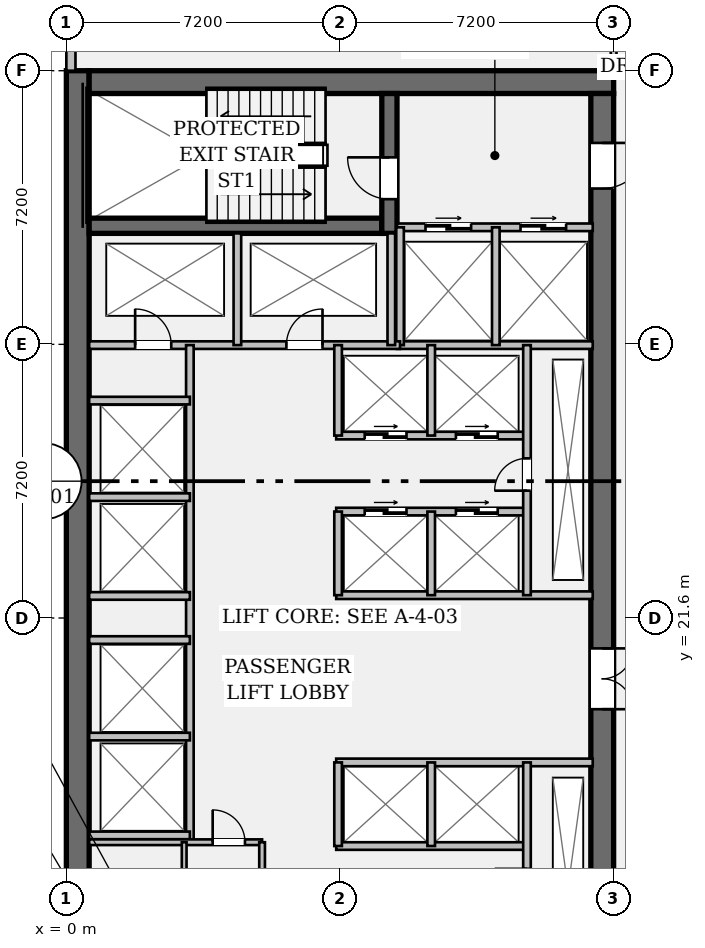
"""IFC4 building model, lengths in metres.
Left out: names, types, materials, properties, quantities, classifications, styles, units other than length and angle.
Written with IfcOpenShell. Run it as: python <this file> out.ifc"""

import sys

from ifc_helpers import new_model, si_unit, direction, frame, frame_2d, origin, place, context, subcontext, project, spatial, rectangle, extrude, element, fill, save


model = new_model("IFC4")
c1 = context("Model", 3, precision=1e-05, world=origin(), true_north=direction((0.0, 1.0)))
c2 = subcontext(c1, "Body", "Model", "MODEL_VIEW")
j1 = project(units=[si_unit("LENGTHUNIT", "METRE"), si_unit("PLANEANGLEUNIT", "RADIAN")], contexts=[c1])
p1 = place(None, origin())
s1 = spatial("IfcSite", under=j1, at=p1, CompositionType="ELEMENT")
p2 = place(p1, origin())
s2 = spatial("IfcBuilding", under=s1, at=p2, CompositionType="ELEMENT")
p3 = place(p2, frame((0.0, 0.0, 22.05)))
s3 = spatial("IfcBuildingStorey", under=s2, at=p3, CompositionType="ELEMENT", Elevation=22.05)
p4 = place(p3, frame((0.3, 7.2, 0.0), z_axis=(0.0, 0.0, 1.0), x_axis=(0.0, 1.0, 0.0)))
e1 = element("IfcWall", 1, at=p4, inside=s3, PredefinedType="SHEAR", context=c2, shape_type="SweptSolid", body=[
    extrude(rectangle(XDim=28.8, YDim=0.6, at=frame_2d((14.4, 0.0))), origin(), (0.0, 0.0, 1.0), 3.9),
])
p5 = place(p3, frame((0.6, 35.7, 0.0), z_axis=(0.0, 0.0, 1.0), x_axis=(1.0, 0.0, 0.0)))
e2 = element("IfcWall", 2, at=p5, inside=s3, PredefinedType="SHEAR", context=c2, shape_type="SweptSolid", body=[
    extrude(rectangle(XDim=13.8, YDim=0.6, at=frame_2d((6.9, 0.0))), origin(), (0.0, 0.0, 1.0), 3.9),
])
p6 = place(p3, frame((14.1, 35.4, 0.0), z_axis=(0.0, 0.0, 1.0), x_axis=(0.0, -1.0, 0.0)))
e3 = element("IfcWall", 3, at=p6, inside=s3, PredefinedType="SHEAR", context=c2, shape_type="SweptSolid", body=[
    extrude(rectangle(XDim=27.6, YDim=0.6, at=frame_2d((13.8, 0.0))), origin(), (0.0, 0.0, 1.0), 3.9),
])
p7 = place(p6, frame((1.3, 0.0, 0.0)))
e4 = element("IfcOpeningElement", 4, at=p7, cuts=e3, PredefinedType="OPENING", context=c2, shape_type="SweptSolid", body=[
    extrude(rectangle(XDim=1.2, YDim=2.15, at=frame_2d((0.6, 1.075))), frame((0.0, 0.312, 0.0), z_axis=(0.0, -1.0, 0.0), x_axis=(1.0, 0.0, 0.0)), (0.0, 0.0, 1.0), 0.624),
])
p8 = place(p6, frame((25.25, 0.0, 0.0)))
e5 = element("IfcOpeningElement", 5, at=p8, cuts=e3, PredefinedType="OPENING", context=c2, shape_type="SweptSolid", body=[
    extrude(rectangle(XDim=1.2, YDim=2.15, at=frame_2d((0.6, 1.075))), frame((0.0, 0.312, 0.0), z_axis=(0.0, -1.0, 0.0), x_axis=(1.0, 0.0, 0.0)), (0.0, 0.0, 1.0), 0.624),
])
p9 = place(p6, frame((14.6, 0.0, 0.0)))
e6 = element("IfcOpeningElement", 6, at=p9, cuts=e3, PredefinedType="OPENING", context=c2, shape_type="SweptSolid", body=[
    extrude(rectangle(XDim=1.6, YDim=2.2, at=frame_2d((0.8, 1.1))), frame((0.0, 0.312, 0.0), z_axis=(0.0, -1.0, 0.0), x_axis=(1.0, 0.0, 0.0)), (0.0, 0.0, 1.0), 0.624),
])
p10 = place(p3, frame((0.6, 31.92, 0.0), z_axis=(0.0, 0.0, 1.0), x_axis=(1.0, 0.0, 0.0)))
e7 = element("IfcWall", 7, at=p10, inside=s3, PredefinedType="SHEAR", context=c2, shape_type="SweptSolid", body=[
    extrude(rectangle(XDim=7.7, YDim=0.4, at=frame_2d((3.85, 0.0))), origin(), (0.0, 0.0, 1.0), 3.9),
])
p11 = place(p3, frame((8.5, 31.72, 0.0), z_axis=(0.0, 0.0, 1.0), x_axis=(0.0, 1.0, 0.0)))
e8 = element("IfcWall", 8, at=p11, inside=s3, PredefinedType="SHEAR", context=c2, shape_type="SweptSolid", body=[
    extrude(rectangle(XDim=3.68, YDim=0.4, at=frame_2d((1.84, 0.0))), origin(), (0.0, 0.0, 1.0), 3.9),
])
p12 = place(p11, frame((0.9, 0.0, 0.0)))
e9 = element("IfcOpeningElement", 9, at=p12, cuts=e8, PredefinedType="OPENING", context=c2, shape_type="SweptSolid", body=[
    extrude(rectangle(XDim=1.1, YDim=2.15, at=frame_2d((0.55, 1.075))), frame((0.0, 0.212, 0.0), z_axis=(0.0, -1.0, 0.0), x_axis=(1.0, 0.0, 0.0)), (0.0, 0.0, 1.0), 0.424),
])
p13 = place(p3, frame((0.12, 36.0, 0.0), z_axis=(0.0, 0.0, 1.0), x_axis=(0.0, 1.0, 0.0)))
e10 = element("IfcWall", 10, at=p13, inside=s3, PredefinedType="STANDARD", context=c2, shape_type="SweptSolid", body=[
    extrude(rectangle(XDim=11.58, YDim=0.24, at=frame_2d((5.79, 0.0))), origin(), (0.0, 0.0, 1.0), 3.9),
])
p14 = place(p13, frame((4.44, 0.0, 0.95)))
e11 = element("IfcOpeningElement", 11, at=p14, cuts=e10, PredefinedType="OPENING", context=c2, shape_type="SweptSolid", body=[
    extrude(rectangle(XDim=2.7, YDim=1.65, at=frame_2d((1.35, 0.825))), frame((0.0, 0.132, 0.0), z_axis=(0.0, -1.0, 0.0), x_axis=(1.0, 0.0, 0.0)), (0.0, 0.0, 1.0), 0.264),
])
p15 = place(p3, frame((8.7, 31.88, 0.0), z_axis=(0.0, 0.0, 1.0), x_axis=(1.0, 0.0, 0.0)))
e12 = element("IfcWall", 12, at=p15, inside=s3, PredefinedType="PARTITIONING", context=c2, shape_type="SweptSolid", body=[
    extrude(rectangle(XDim=5.15, YDim=0.2, at=frame_2d((2.575, 0.0))), origin(), (0.0, 0.0, 1.0), 3.9),
])
p16 = place(p15, frame((0.75, 0.0, 0.0)))
e13 = element("IfcOpeningElement", 13, at=p16, cuts=e12, PredefinedType="OPENING", context=c2, shape_type="SweptSolid", body=[
    extrude(rectangle(XDim=1.2, YDim=2.2, at=frame_2d((0.6, 1.1))), frame((0.0, 0.112, 0.0), z_axis=(0.0, -1.0, 0.0), x_axis=(1.0, 0.0, 0.0)), (0.0, 0.0, 1.0), 0.224),
])
p17 = place(p15, frame((3.25, 0.0, 0.0)))
e14 = element("IfcOpeningElement", 14, at=p17, cuts=e12, PredefinedType="OPENING", context=c2, shape_type="SweptSolid", body=[
    extrude(rectangle(XDim=1.2, YDim=2.2, at=frame_2d((0.6, 1.1))), frame((0.0, 0.112, 0.0), z_axis=(0.0, -1.0, 0.0), x_axis=(1.0, 0.0, 0.0)), (0.0, 0.0, 1.0), 0.224),
])
p18 = place(p3, frame((8.7, 28.78, 0.0), z_axis=(0.0, 0.0, 1.0), x_axis=(1.0, 0.0, 0.0)))
e15 = element("IfcWall", 15, at=p18, inside=s3, PredefinedType="PARTITIONING", context=c2, shape_type="SweptSolid", body=[
    extrude(rectangle(XDim=5.15, YDim=0.2, at=frame_2d((2.575, 0.0))), origin(), (0.0, 0.0, 1.0), 3.9),
])
for number, where, z_axis, x_axis in (
    (16, (8.78, 28.78, 0.0), (0.0, 0.0, 1.0), (0.0, 1.0, 0.0)),
    (17, (11.3, 28.78, 0.0), (0.0, 0.0, 1.0), (0.0, 1.0, 0.0)),
):
    element("IfcWall", number, at=place(p3, frame(where, z_axis=z_axis, x_axis=x_axis)), inside=s3, PredefinedType="PARTITIONING", context=c2, shape_type="SweptSolid", body=[
        extrude(rectangle(XDim=3.1, YDim=0.2, at=frame_2d((1.55, 0.0))), origin(), (0.0, 0.0, 1.0), 3.9),
    ])
p19 = place(p3, frame((0.6, 28.78, 0.0), z_axis=(0.0, 0.0, 1.0), x_axis=(1.0, 0.0, 0.0)))
e18 = element("IfcWall", 18, at=p19, inside=s3, PredefinedType="PARTITIONING", context=c2, shape_type="SweptSolid", body=[
    extrude(rectangle(XDim=8.18, YDim=0.2, at=frame_2d((4.09, 0.0))), origin(), (0.0, 0.0, 1.0), 3.9),
])
p20 = place(p19, frame((1.21, 0.0, 0.0)))
e19 = element("IfcOpeningElement", 19, at=p20, cuts=e18, PredefinedType="OPENING", context=c2, shape_type="SweptSolid", body=[
    extrude(rectangle(XDim=0.95, YDim=2.15, at=frame_2d((0.475, 1.075))), frame((0.0, 0.112, 0.0), z_axis=(0.0, -1.0, 0.0), x_axis=(1.0, 0.0, 0.0)), (0.0, 0.0, 1.0), 0.224),
])
p21 = place(p19, frame((5.19, 0.0, 0.0)))
e20 = element("IfcOpeningElement", 20, at=p21, cuts=e18, PredefinedType="OPENING", context=c2, shape_type="SweptSolid", body=[
    extrude(rectangle(XDim=0.95, YDim=2.15, at=frame_2d((0.475, 1.075))), frame((0.0, 0.112, 0.0), z_axis=(0.0, -1.0, 0.0), x_axis=(1.0, 0.0, 0.0)), (0.0, 0.0, 1.0), 0.224),
])
for number, where, z_axis, x_axis in (
    (21, (4.5, 28.78, 0.0), (0.0, 0.0, 1.0), (0.0, 1.0, 0.0)),
    (22, (8.55, 28.78, 0.0), (0.0, 0.0, 1.0), (0.0, 1.0, 0.0)),
):
    element("IfcWall", number, at=place(p3, frame(where, z_axis=z_axis, x_axis=x_axis)), inside=s3, PredefinedType="PARTITIONING", context=c2, shape_type="SweptSolid", body=[
        extrude(rectangle(XDim=2.94, YDim=0.2, at=frame_2d((1.47, 0.0))), origin(), (0.0, 0.0, 1.0), 3.9),
    ])
p22 = place(p3, frame((3.25, 15.7, 0.0), z_axis=(0.0, 0.0, 1.0), x_axis=(0.0, 1.0, 0.0)))
e23 = element("IfcWall", 23, at=p22, inside=s3, PredefinedType="PARTITIONING", context=c2, shape_type="SweptSolid", body=[
    extrude(rectangle(XDim=13.08, YDim=0.2, at=frame_2d((6.54, 0.0))), origin(), (0.0, 0.0, 1.0), 3.9),
])
for number, where, z_axis, x_axis in (
    (24, (0.6, 15.88, 0.0), (0.0, 0.0, 1.0), (1.0, 0.0, 0.0)),
    (25, (0.6, 18.48, 0.0), (0.0, 0.0, 1.0), (1.0, 0.0, 0.0)),
    (26, (0.6, 22.18, 0.0), (0.0, 0.0, 1.0), (1.0, 0.0, 0.0)),
    (27, (0.6, 24.78, 0.0), (0.0, 0.0, 1.0), (1.0, 0.0, 0.0)),
    (28, (0.6, 21.02, 0.0), (0.0, 0.0, 1.0), (1.0, 0.0, 0.0)),
    (29, (0.6, 27.32, 0.0), (0.0, 0.0, 1.0), (1.0, 0.0, 0.0)),
):
    element("IfcWall", number, at=place(p3, frame(where, z_axis=z_axis, x_axis=x_axis)), inside=s3, PredefinedType="PARTITIONING", context=c2, shape_type="SweptSolid", body=[
        extrude(rectangle(XDim=2.65, YDim=0.2, at=frame_2d((1.325, 0.0))), origin(), (0.0, 0.0, 1.0), 3.9),
    ])
p23 = place(p3, frame((7.1, 22.2, 0.0), z_axis=(0.0, 0.0, 1.0), x_axis=(1.0, 0.0, 0.0)))
e30 = element("IfcWall", 30, at=p23, inside=s3, PredefinedType="PARTITIONING", context=c2, shape_type="SweptSolid", body=[
    extrude(rectangle(XDim=6.75, YDim=0.2, at=frame_2d((3.375, 0.0))), origin(), (0.0, 0.0, 1.0), 3.9),
])
p24 = place(p3, frame((7.1, 24.4, 0.0), z_axis=(0.0, 0.0, 1.0), x_axis=(1.0, 0.0, 0.0)))
e31 = element("IfcWall", 31, at=p24, inside=s3, PredefinedType="PARTITIONING", context=c2, shape_type="SweptSolid", body=[
    extrude(rectangle(XDim=5.02, YDim=0.2, at=frame_2d((2.51, 0.0))), origin(), (0.0, 0.0, 1.0), 3.9),
])
p25 = place(p24, frame((0.75, 0.0, 0.0)))
e32 = element("IfcOpeningElement", 32, at=p25, cuts=e31, PredefinedType="OPENING", context=c2, shape_type="SweptSolid", body=[
    extrude(rectangle(XDim=1.1, YDim=2.2, at=frame_2d((0.55, 1.1))), frame((0.0, 0.112, 0.0), z_axis=(0.0, -1.0, 0.0), x_axis=(1.0, 0.0, 0.0)), (0.0, 0.0, 1.0), 0.224),
])
p26 = place(p24, frame((3.15, 0.0, 0.0)))
e33 = element("IfcOpeningElement", 33, at=p26, cuts=e31, PredefinedType="OPENING", context=c2, shape_type="SweptSolid", body=[
    extrude(rectangle(XDim=1.1, YDim=2.2, at=frame_2d((0.55, 1.1))), frame((0.0, 0.112, 0.0), z_axis=(0.0, -1.0, 0.0), x_axis=(1.0, 0.0, 0.0)), (0.0, 0.0, 1.0), 0.224),
])
p27 = place(p3, frame((7.1, 26.4, 0.0), z_axis=(0.0, 0.0, 1.0), x_axis=(1.0, 0.0, 0.0)))
e34 = element("IfcWall", 34, at=p27, inside=s3, PredefinedType="PARTITIONING", context=c2, shape_type="SweptSolid", body=[
    extrude(rectangle(XDim=5.02, YDim=0.2, at=frame_2d((2.51, 0.0))), origin(), (0.0, 0.0, 1.0), 3.9),
])
p28 = place(p27, frame((0.75, 0.0, 0.0)))
e35 = element("IfcOpeningElement", 35, at=p28, cuts=e34, PredefinedType="OPENING", context=c2, shape_type="SweptSolid", body=[
    extrude(rectangle(XDim=1.1, YDim=2.2, at=frame_2d((0.55, 1.1))), frame((0.0, 0.112, 0.0), z_axis=(0.0, -1.0, 0.0), x_axis=(1.0, 0.0, 0.0)), (0.0, 0.0, 1.0), 0.224),
])
p29 = place(p27, frame((3.15, 0.0, 0.0)))
e36 = element("IfcOpeningElement", 36, at=p29, cuts=e34, PredefinedType="OPENING", context=c2, shape_type="SweptSolid", body=[
    extrude(rectangle(XDim=1.1, YDim=2.2, at=frame_2d((0.55, 1.1))), frame((0.0, 0.112, 0.0), z_axis=(0.0, -1.0, 0.0), x_axis=(1.0, 0.0, 0.0)), (0.0, 0.0, 1.0), 0.224),
])
p30 = place(p3, frame((7.15, 22.2, 0.0), z_axis=(0.0, 0.0, 1.0), x_axis=(0.0, 1.0, 0.0)))
e37 = element("IfcWall", 37, at=p30, inside=s3, PredefinedType="PARTITIONING", context=c2, shape_type="SweptSolid", body=[
    extrude(rectangle(XDim=2.2, YDim=0.2, at=frame_2d((1.1, 0.0))), origin(), (0.0, 0.0, 1.0), 3.9),
])
p31 = place(p3, frame((7.15, 26.4, 0.0), z_axis=(0.0, 0.0, 1.0), x_axis=(0.0, 1.0, 0.0)))
e38 = element("IfcWall", 38, at=p31, inside=s3, PredefinedType="PARTITIONING", context=c2, shape_type="SweptSolid", body=[
    extrude(rectangle(XDim=2.38, YDim=0.2, at=frame_2d((1.19, 0.0))), origin(), (0.0, 0.0, 1.0), 3.9),
])
p32 = place(p3, frame((9.6, 22.2, 0.0), z_axis=(0.0, 0.0, 1.0), x_axis=(0.0, 1.0, 0.0)))
e39 = element("IfcWall", 39, at=p32, inside=s3, PredefinedType="PARTITIONING", context=c2, shape_type="SweptSolid", body=[
    extrude(rectangle(XDim=2.2, YDim=0.2, at=frame_2d((1.1, 0.0))), origin(), (0.0, 0.0, 1.0), 3.9),
])
p33 = place(p3, frame((9.6, 26.4, 0.0), z_axis=(0.0, 0.0, 1.0), x_axis=(0.0, 1.0, 0.0)))
e40 = element("IfcWall", 40, at=p33, inside=s3, PredefinedType="PARTITIONING", context=c2, shape_type="SweptSolid", body=[
    extrude(rectangle(XDim=2.38, YDim=0.2, at=frame_2d((1.19, 0.0))), origin(), (0.0, 0.0, 1.0), 3.9),
])
p34 = place(p3, frame((12.12, 22.2, 0.0), z_axis=(0.0, 0.0, 1.0), x_axis=(0.0, 1.0, 0.0)))
e41 = element("IfcWall", 41, at=p34, inside=s3, PredefinedType="PARTITIONING", context=c2, shape_type="SweptSolid", body=[
    extrude(rectangle(XDim=6.58, YDim=0.2, at=frame_2d((3.29, 0.0))), origin(), (0.0, 0.0, 1.0), 3.9),
])
p35 = place(p34, frame((2.75, 0.0, 0.0)))
e42 = element("IfcOpeningElement", 42, at=p35, cuts=e41, PredefinedType="OPENING", context=c2, shape_type="SweptSolid", body=[
    extrude(rectangle(XDim=0.85, YDim=2.15, at=frame_2d((0.425, 1.075))), frame((0.0, 0.112, 0.0), z_axis=(0.0, -1.0, 0.0), x_axis=(1.0, 0.0, 0.0)), (0.0, 0.0, 1.0), 0.224),
])
p36 = place(p3, frame((7.1, 17.8, 0.0), z_axis=(0.0, 0.0, 1.0), x_axis=(1.0, 0.0, 0.0)))
e43 = element("IfcWall", 43, at=p36, inside=s3, PredefinedType="PARTITIONING", context=c2, shape_type="SweptSolid", body=[
    extrude(rectangle(XDim=6.75, YDim=0.2, at=frame_2d((3.375, 0.0))), origin(), (0.0, 0.0, 1.0), 3.9),
])
p37 = place(p3, frame((7.1, 15.6, 0.0), z_axis=(0.0, 0.0, 1.0), x_axis=(1.0, 0.0, 0.0)))
e44 = element("IfcWall", 44, at=p37, inside=s3, PredefinedType="PARTITIONING", context=c2, shape_type="SweptSolid", body=[
    extrude(rectangle(XDim=5.02, YDim=0.2, at=frame_2d((2.51, 0.0))), origin(), (0.0, 0.0, 1.0), 3.9),
])
for number, where, z_axis, x_axis in (
    (45, (7.15, 15.6, 0.0), (0.0, 0.0, 1.0), (0.0, 1.0, 0.0)),
    (46, (9.6, 15.6, 0.0), (0.0, 0.0, 1.0), (0.0, 1.0, 0.0)),
):
    element("IfcWall", number, at=place(p3, frame(where, z_axis=z_axis, x_axis=x_axis)), inside=s3, PredefinedType="PARTITIONING", context=c2, shape_type="SweptSolid", body=[
        extrude(rectangle(XDim=2.2, YDim=0.2, at=frame_2d((1.1, 0.0))), origin(), (0.0, 0.0, 1.0), 3.9),
    ])
p38 = place(p3, frame((12.12, 11.2, 0.0), z_axis=(0.0, 0.0, 1.0), x_axis=(0.0, 1.0, 0.0)))
e47 = element("IfcWall", 47, at=p38, inside=s3, PredefinedType="PARTITIONING", context=c2, shape_type="SweptSolid", body=[
    extrude(rectangle(XDim=6.6, YDim=0.2, at=frame_2d((3.3, 0.0))), origin(), (0.0, 0.0, 1.0), 3.9),
])
p39 = place(p38, frame((2.95, 0.0, 0.0)))
e48 = element("IfcOpeningElement", 48, at=p39, cuts=e47, PredefinedType="OPENING", context=c2, shape_type="SweptSolid", body=[
    extrude(rectangle(XDim=0.85, YDim=2.15, at=frame_2d((0.425, 1.075))), frame((0.0, 0.112, 0.0), z_axis=(0.0, -1.0, 0.0), x_axis=(1.0, 0.0, 0.0)), (0.0, 0.0, 1.0), 0.224),
])
p40 = place(p3, frame((0.6, 15.7, 0.0), z_axis=(0.0, 0.0, 1.0), x_axis=(1.0, 0.0, 0.0)))
e49 = element("IfcWall", 49, at=p40, inside=s3, PredefinedType="PARTITIONING", context=c2, shape_type="SweptSolid", body=[
    extrude(rectangle(XDim=4.55, YDim=0.15, at=frame_2d((2.275, 0.0))), origin(), (0.0, 0.0, 1.0), 3.9),
])
p41 = place(p40, frame((3.25, 0.0, 0.0)))
e50 = element("IfcOpeningElement", 50, at=p41, cuts=e49, PredefinedType="OPENING", context=c2, shape_type="SweptSolid", body=[
    extrude(rectangle(XDim=0.85, YDim=2.15, at=frame_2d((0.425, 1.075))), frame((0.0, 0.087, 0.0), z_axis=(0.0, -1.0, 0.0), x_axis=(1.0, 0.0, 0.0)), (0.0, 0.0, 1.0), 0.174),
])
p42 = place(p3, frame((5.15, 11.28, 0.0), z_axis=(0.0, 0.0, 1.0), x_axis=(0.0, 1.0, 0.0)))
e51 = element("IfcWall", 51, at=p42, inside=s3, PredefinedType="PARTITIONING", context=c2, shape_type="SweptSolid", body=[
    extrude(rectangle(XDim=4.42, YDim=0.15, at=frame_2d((2.21, 0.0))), origin(), (0.0, 0.0, 1.0), 3.9),
])
p43 = place(p3, frame((3.1, 11.28, 0.0), z_axis=(0.0, 0.0, 1.0), x_axis=(0.0, 1.0, 0.0)))
e52 = element("IfcWall", 52, at=p43, inside=s3, PredefinedType="PARTITIONING", context=c2, shape_type="SweptSolid", body=[
    extrude(rectangle(XDim=4.42, YDim=0.125, at=frame_2d((2.21, 0.0))), origin(), (0.0, 0.0, 1.0), 3.9),
])
p44 = place(p43, frame((0.65, 0.0, 0.0)))
e53 = element("IfcOpeningElement", 53, at=p44, cuts=e52, PredefinedType="OPENING", context=c2, shape_type="SweptSolid", body=[
    extrude(rectangle(XDim=0.85, YDim=2.15, at=frame_2d((0.425, 1.075))), frame((0.0, 0.074, 0.0), z_axis=(0.0, -1.0, 0.0), x_axis=(1.0, 0.0, 0.0)), (0.0, 0.0, 1.0), 0.149),
])
p45 = place(p43, frame((2.75, 0.0, 0.0)))
e54 = element("IfcOpeningElement", 54, at=p45, cuts=e52, PredefinedType="OPENING", context=c2, shape_type="SweptSolid", body=[
    extrude(rectangle(XDim=0.85, YDim=2.15, at=frame_2d((0.425, 1.075))), frame((0.0, 0.074, 0.0), z_axis=(0.0, -1.0, 0.0), x_axis=(1.0, 0.0, 0.0)), (0.0, 0.0, 1.0), 0.149),
])
p46 = place(p3, frame((14.4, 36.0, 0.0), z_axis=(0.0, 0.0, 1.0), x_axis=(0.0, 1.0, 0.0)))
e55 = element("IfcWall", 55, at=p46, inside=s3, PredefinedType="PARTITIONING", context=c2, shape_type="SweptSolid", body=[
    extrude(rectangle(XDim=7.9, YDim=0.15, at=frame_2d((3.95, 0.0))), origin(), (0.0, 0.0, 1.0), 2.958),
])
p47 = place(p46, frame((2.6, 0.0, 0.0)))
e56 = element("IfcOpeningElement", 56, at=p47, cuts=e55, PredefinedType="OPENING", context=c2, shape_type="SweptSolid", body=[
    extrude(rectangle(XDim=1.0, YDim=2.15, at=frame_2d((0.5, 1.075))), frame((0.0, 0.087, 0.0), z_axis=(0.0, -1.0, 0.0), x_axis=(1.0, 0.0, 0.0)), (0.0, 0.0, 1.0), 0.174),
])
p48 = place(p12, origin())
e57 = element("IfcDoor", 57, at=p48, inside=s3, OperationType="SINGLE_SWING_RIGHT", PredefinedType="DOOR", context=c2, shape_type="SweptSolid", body=[
    extrude(rectangle(XDim=1.1, YDim=2.15, at=frame_2d((0.55, 1.075))), frame((0.0, 0.025, 0.0), z_axis=(0.0, -1.0, 0.0), x_axis=(1.0, 0.0, 0.0)), (0.0, 0.0, 1.0), 0.05),
])
fill(e9, e57)
p49 = place(p7, origin())
e58 = element("IfcDoor", 58, at=p49, inside=s3, OperationType="SINGLE_SWING_LEFT", PredefinedType="DOOR", context=c2, shape_type="SweptSolid", body=[
    extrude(rectangle(XDim=1.2, YDim=2.15, at=frame_2d((0.6, 1.075))), frame((0.0, 0.025, 0.0), z_axis=(0.0, -1.0, 0.0), x_axis=(1.0, 0.0, 0.0)), (0.0, 0.0, 1.0), 0.05),
])
fill(e4, e58)
p50 = place(p16, origin())
e59 = element("IfcDoor", 59, at=p50, inside=s3, OperationType="DOUBLE_DOOR_SLIDING", PredefinedType="DOOR", context=c2, shape_type="SweptSolid", body=[
    extrude(rectangle(XDim=1.2, YDim=2.2, at=frame_2d((0.6, 1.1))), frame((0.0, 0.025, 0.0), z_axis=(0.0, -1.0, 0.0), x_axis=(1.0, 0.0, 0.0)), (0.0, 0.0, 1.0), 0.05),
])
fill(e13, e59)
p51 = place(p17, origin())
e60 = element("IfcDoor", 60, at=p51, inside=s3, OperationType="DOUBLE_DOOR_SLIDING", PredefinedType="DOOR", context=c2, shape_type="SweptSolid", body=[
    extrude(rectangle(XDim=1.2, YDim=2.2, at=frame_2d((0.6, 1.1))), frame((0.0, 0.025, 0.0), z_axis=(0.0, -1.0, 0.0), x_axis=(1.0, 0.0, 0.0)), (0.0, 0.0, 1.0), 0.05),
])
fill(e14, e60)
p52 = place(p20, origin())
e61 = element("IfcDoor", 61, at=p52, inside=s3, OperationType="SINGLE_SWING_LEFT", PredefinedType="DOOR", context=c2, shape_type="SweptSolid", body=[
    extrude(rectangle(XDim=0.95, YDim=2.15, at=frame_2d((0.475, 1.075))), frame((0.0, 0.025, 0.0), z_axis=(0.0, -1.0, 0.0), x_axis=(1.0, 0.0, 0.0)), (0.0, 0.0, 1.0), 0.05),
])
fill(e19, e61)
p53 = place(p21, origin())
e62 = element("IfcDoor", 62, at=p53, inside=s3, OperationType="SINGLE_SWING_RIGHT", PredefinedType="DOOR", context=c2, shape_type="SweptSolid", body=[
    extrude(rectangle(XDim=0.95, YDim=2.15, at=frame_2d((0.475, 1.075))), frame((0.0, 0.025, 0.0), z_axis=(0.0, -1.0, 0.0), x_axis=(1.0, 0.0, 0.0)), (0.0, 0.0, 1.0), 0.05),
])
fill(e20, e62)
p54 = place(p9, origin())
e63 = element("IfcDoor", 63, at=p54, inside=s3, OperationType="DOUBLE_DOOR_SINGLE_SWING", PredefinedType="DOOR", context=c2, shape_type="SweptSolid", body=[
    extrude(rectangle(XDim=1.6, YDim=2.2, at=frame_2d((0.8, 1.1))), frame((0.0, 0.025, 0.0), z_axis=(0.0, -1.0, 0.0), x_axis=(1.0, 0.0, 0.0)), (0.0, 0.0, 1.0), 0.05),
])
fill(e6, e63)
p55 = place(p35, origin())
e64 = element("IfcDoor", 64, at=p55, inside=s3, OperationType="SINGLE_SWING_LEFT", PredefinedType="DOOR", context=c2, shape_type="SweptSolid", body=[
    extrude(rectangle(XDim=0.85, YDim=2.15, at=frame_2d((0.425, 1.075))), frame((0.0, 0.025, 0.0), z_axis=(0.0, -1.0, 0.0), x_axis=(1.0, 0.0, 0.0)), (0.0, 0.0, 1.0), 0.05),
])
fill(e42, e64)
p56 = place(p25, origin())
e65 = element("IfcDoor", 65, at=p56, inside=s3, OperationType="DOUBLE_DOOR_SLIDING", PredefinedType="DOOR", context=c2, shape_type="SweptSolid", body=[
    extrude(rectangle(XDim=1.1, YDim=2.2, at=frame_2d((0.55, 1.1))), frame((0.0, 0.025, 0.0), z_axis=(0.0, -1.0, 0.0), x_axis=(1.0, 0.0, 0.0)), (0.0, 0.0, 1.0), 0.05),
])
fill(e32, e65)
p57 = place(p26, origin())
e66 = element("IfcDoor", 66, at=p57, inside=s3, OperationType="DOUBLE_DOOR_SLIDING", PredefinedType="DOOR", context=c2, shape_type="SweptSolid", body=[
    extrude(rectangle(XDim=1.1, YDim=2.2, at=frame_2d((0.55, 1.1))), frame((0.0, 0.025, 0.0), z_axis=(0.0, -1.0, 0.0), x_axis=(1.0, 0.0, 0.0)), (0.0, 0.0, 1.0), 0.05),
])
fill(e33, e66)
p58 = place(p28, origin())
e67 = element("IfcDoor", 67, at=p58, inside=s3, OperationType="DOUBLE_DOOR_SLIDING", PredefinedType="DOOR", context=c2, shape_type="SweptSolid", body=[
    extrude(rectangle(XDim=1.1, YDim=2.2, at=frame_2d((0.55, 1.1))), frame((0.0, 0.025, 0.0), z_axis=(0.0, -1.0, 0.0), x_axis=(1.0, 0.0, 0.0)), (0.0, 0.0, 1.0), 0.05),
])
fill(e35, e67)
p59 = place(p29, origin())
e68 = element("IfcDoor", 68, at=p59, inside=s3, OperationType="DOUBLE_DOOR_SLIDING", PredefinedType="DOOR", context=c2, shape_type="SweptSolid", body=[
    extrude(rectangle(XDim=1.1, YDim=2.2, at=frame_2d((0.55, 1.1))), frame((0.0, 0.025, 0.0), z_axis=(0.0, -1.0, 0.0), x_axis=(1.0, 0.0, 0.0)), (0.0, 0.0, 1.0), 0.05),
])
fill(e36, e68)
p60 = place(p41, origin())
e69 = element("IfcDoor", 69, at=p60, inside=s3, OperationType="SINGLE_SWING_LEFT", PredefinedType="DOOR", context=c2, shape_type="SweptSolid", body=[
    extrude(rectangle(XDim=0.85, YDim=2.15, at=frame_2d((0.425, 1.075))), frame((0.0, 0.025, 0.0), z_axis=(0.0, -1.0, 0.0), x_axis=(1.0, 0.0, 0.0)), (0.0, 0.0, 1.0), 0.05),
])
fill(e50, e69)
save(model, sys.argv[1])
